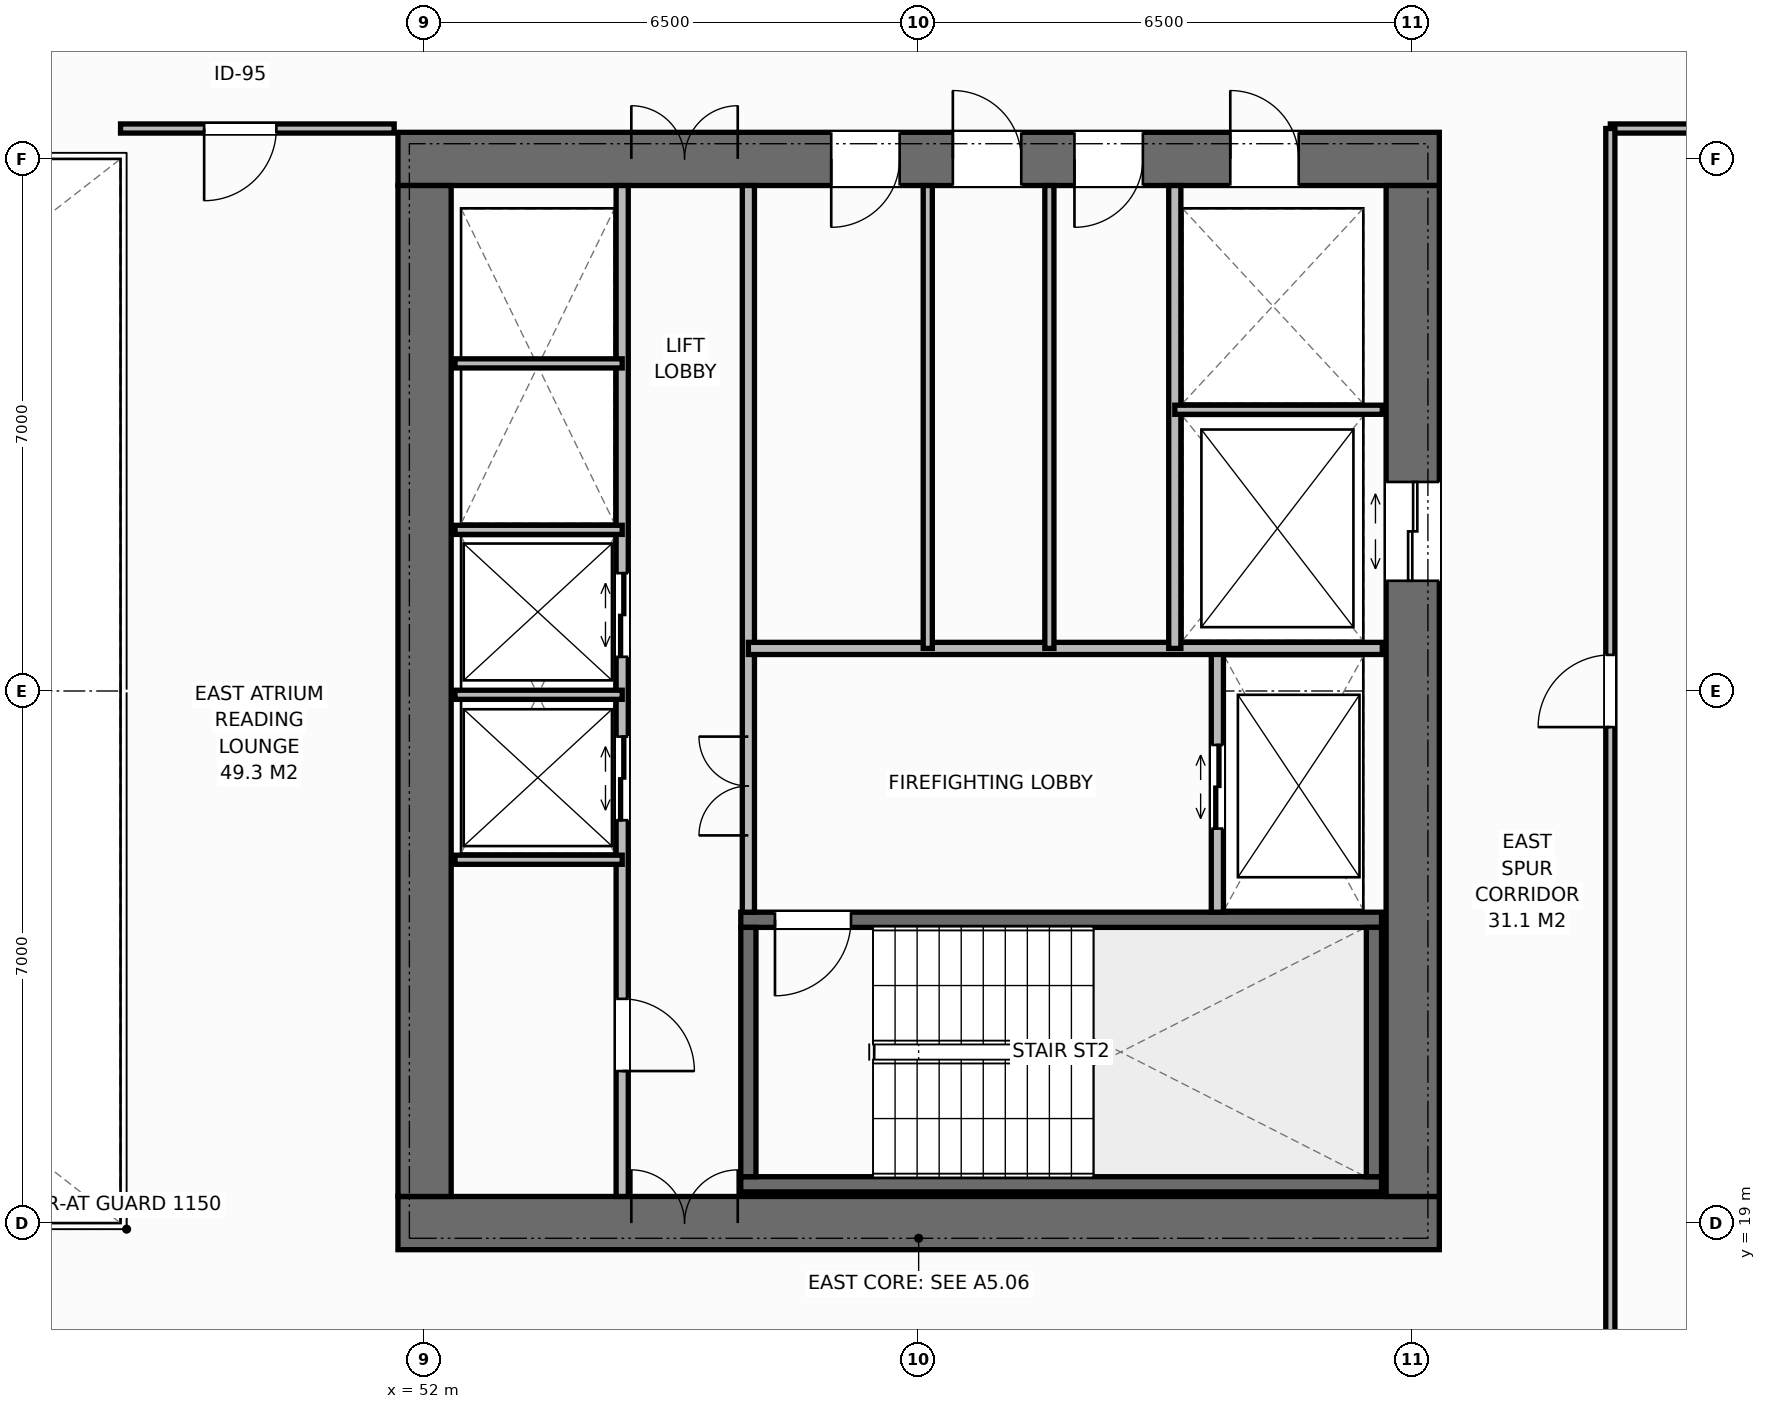
"""IFC4 building model, lengths in metres.
Left out: names, types, materials, properties, quantities, classifications, styles, units other than length and angle.
Written with IfcOpenShell. Run it as: python <this file> out.ifc"""

import sys

from ifc_helpers import new_model, si_unit, direction, frame, frame_2d, origin, place, context, subcontext, project, spatial, rectangle, extrude, element, fill, save


model = new_model("IFC4")
c1 = context("Model", 3, precision=1e-05, world=origin(), true_north=direction((0.0, 1.0)))
c2 = subcontext(c1, "Body", "Model", "MODEL_VIEW")
j1 = project(units=[si_unit("LENGTHUNIT", "METRE"), si_unit("PLANEANGLEUNIT", "RADIAN")], contexts=[c1])
p1 = place(None, origin())
s1 = spatial("IfcSite", under=j1, at=p1, CompositionType="ELEMENT")
p2 = place(p1, origin())
s2 = spatial("IfcBuilding", under=s1, at=p2, CompositionType="ELEMENT")
p3 = place(p2, frame((0.0, 0.0, 108.8)))
s3 = spatial("IfcBuildingStorey", under=s2, at=p3, CompositionType="ELEMENT", Elevation=108.8)
p4 = place(p3, frame((51.65, 19.0, 0.0), z_axis=(0.0, 0.0, 1.0), x_axis=(1.0, 0.0, 0.0)))
e1 = element("IfcWall", 1, at=p4, inside=s3, PredefinedType="SHEAR", context=c2, shape_type="SweptSolid", body=[
    extrude(rectangle(XDim=13.7, YDim=0.7, at=frame_2d((6.85, 0.0))), origin(), (0.0, 0.0, 1.0), 3.8),
])
p5 = place(p4, frame((3.07, 0.0, 0.0)))
e2 = element("IfcOpeningElement", 2, at=p5, cuts=e1, PredefinedType="OPENING", context=c2, shape_type="SweptSolid", body=[
    extrude(rectangle(XDim=1.4, YDim=2.2, at=frame_2d((0.7, 1.1))), frame((0.0, 0.36, 0.0), z_axis=(0.0, -1.0, 0.0), x_axis=(1.0, 0.0, 0.0)), (0.0, 0.0, 1.0), 0.72),
])
p6 = place(p3, frame((51.65, 33.0, 0.0), z_axis=(0.0, 0.0, 1.0), x_axis=(1.0, 0.0, 0.0)))
e3 = element("IfcWall", 3, at=p6, inside=s3, PredefinedType="SHEAR", context=c2, shape_type="SweptSolid", body=[
    extrude(rectangle(XDim=13.7, YDim=0.7, at=frame_2d((6.85, 0.0))), origin(), (0.0, 0.0, 1.0), 3.8),
])
p7 = place(p6, frame((3.07, 0.0, 0.0)))
e4 = element("IfcOpeningElement", 4, at=p7, cuts=e3, PredefinedType="OPENING", context=c2, shape_type="SweptSolid", body=[
    extrude(rectangle(XDim=1.4, YDim=2.2, at=frame_2d((0.7, 1.1))), frame((0.0, 0.36, 0.0), z_axis=(0.0, -1.0, 0.0), x_axis=(1.0, 0.0, 0.0)), (0.0, 0.0, 1.0), 0.72),
])
p8 = place(p6, frame((10.95, 0.0, 0.0)))
e5 = element("IfcOpeningElement", 5, at=p8, cuts=e3, PredefinedType="OPENING", context=c2, shape_type="SweptSolid", body=[
    extrude(rectangle(XDim=0.9, YDim=2.15, at=frame_2d((0.45, 1.075))), frame((0.0, 0.36, 0.0), z_axis=(0.0, -1.0, 0.0), x_axis=(1.0, 0.0, 0.0)), (0.0, 0.0, 1.0), 0.72),
])
p9 = place(p6, frame((5.7, 0.0, 0.0)))
e6 = element("IfcOpeningElement", 6, at=p9, cuts=e3, PredefinedType="OPENING", context=c2, shape_type="SweptSolid", body=[
    extrude(rectangle(XDim=0.9, YDim=2.15, at=frame_2d((0.45, 1.075))), frame((0.0, 0.36, 0.0), z_axis=(0.0, -1.0, 0.0), x_axis=(1.0, 0.0, 0.0)), (0.0, 0.0, 1.0), 0.72),
])
p10 = place(p6, frame((7.3, 0.0, 0.0)))
e7 = element("IfcOpeningElement", 7, at=p10, cuts=e3, PredefinedType="OPENING", context=c2, shape_type="SweptSolid", body=[
    extrude(rectangle(XDim=0.9, YDim=2.15, at=frame_2d((0.45, 1.075))), frame((0.0, 0.36, 0.0), z_axis=(0.0, -1.0, 0.0), x_axis=(1.0, 0.0, 0.0)), (0.0, 0.0, 1.0), 0.72),
])
p11 = place(p6, frame((8.9, 0.0, 0.0)))
e8 = element("IfcOpeningElement", 8, at=p11, cuts=e3, PredefinedType="OPENING", context=c2, shape_type="SweptSolid", body=[
    extrude(rectangle(XDim=0.9, YDim=2.15, at=frame_2d((0.45, 1.075))), frame((0.0, 0.36, 0.0), z_axis=(0.0, -1.0, 0.0), x_axis=(1.0, 0.0, 0.0)), (0.0, 0.0, 1.0), 0.72),
])
p12 = place(p3, frame((52.0, 19.35, 0.0), z_axis=(0.0, 0.0, 1.0), x_axis=(0.0, 1.0, 0.0)))
e9 = element("IfcWall", 9, at=p12, inside=s3, PredefinedType="SHEAR", context=c2, shape_type="SweptSolid", body=[
    extrude(rectangle(XDim=13.3, YDim=0.7, at=frame_2d((6.65, 0.0))), origin(), (0.0, 0.0, 1.0), 3.8),
])
p13 = place(p3, frame((65.0, 19.35, 0.0), z_axis=(0.0, 0.0, 1.0), x_axis=(0.0, 1.0, 0.0)))
e10 = element("IfcWall", 10, at=p13, inside=s3, PredefinedType="SHEAR", context=c2, shape_type="SweptSolid", body=[
    extrude(rectangle(XDim=13.3, YDim=0.7, at=frame_2d((6.65, 0.0))), origin(), (0.0, 0.0, 1.0), 3.8),
])
p14 = place(p13, frame((8.1, 0.0, 0.0)))
e11 = element("IfcOpeningElement", 11, at=p14, cuts=e10, PredefinedType="OPENING", context=c2, shape_type="SweptSolid", body=[
    extrude(rectangle(XDim=1.3, YDim=2.2, at=frame_2d((0.65, 1.1))), frame((0.0, 0.36, 0.0), z_axis=(0.0, -1.0, 0.0), x_axis=(1.0, 0.0, 0.0)), (0.0, 0.0, 1.0), 0.72),
])
p15 = place(p3, frame((56.16, 19.51, 0.0), z_axis=(0.0, 0.0, 1.0), x_axis=(1.0, 0.0, 0.0)))
e12 = element("IfcWall", 12, at=p15, inside=s3, PredefinedType="SHEAR", context=c2, shape_type="SweptSolid", body=[
    extrude(rectangle(XDim=8.43, YDim=0.2, at=frame_2d((4.215, 0.0))), origin(), (0.0, 0.0, 1.0), 3.8),
])
p16 = place(p3, frame((56.16, 22.99, 0.0), z_axis=(0.0, 0.0, 1.0), x_axis=(1.0, 0.0, 0.0)))
e13 = element("IfcWall", 13, at=p16, inside=s3, PredefinedType="SHEAR", context=c2, shape_type="SweptSolid", body=[
    extrude(rectangle(XDim=8.43, YDim=0.2, at=frame_2d((4.215, 0.0))), origin(), (0.0, 0.0, 1.0), 3.8),
])
p17 = place(p16, frame((0.45, 0.0, 0.0)))
e14 = element("IfcOpeningElement", 14, at=p17, cuts=e13, PredefinedType="OPENING", context=c2, shape_type="SweptSolid", body=[
    extrude(rectangle(XDim=1.0, YDim=2.15, at=frame_2d((0.5, 1.075))), frame((0.0, 0.11, 0.0), z_axis=(0.0, -1.0, 0.0), x_axis=(1.0, 0.0, 0.0)), (0.0, 0.0, 1.0), 0.22),
])
for number, where, z_axis, x_axis in (
    (15, (56.26, 19.61, 0.0), (0.0, 0.0, 1.0), (0.0, 1.0, 0.0)),
    (16, (64.49, 19.61, 0.0), (0.0, 0.0, 1.0), (0.0, 1.0, 0.0)),
):
    element("IfcWall", number, at=place(p3, frame(where, z_axis=z_axis, x_axis=x_axis)), inside=s3, PredefinedType="SHEAR", context=c2, shape_type="SweptSolid", body=[
        extrude(rectangle(XDim=3.28, YDim=0.2, at=frame_2d((1.64, 0.0))), origin(), (0.0, 0.0, 1.0), 3.8),
    ])
p18 = place(p3, frame((54.6, 19.35, 0.0), z_axis=(0.0, 0.0, 1.0), x_axis=(0.0, 1.0, 0.0)))
e17 = element("IfcWall", 17, at=p18, inside=s3, PredefinedType="STANDARD", context=c2, shape_type="SweptSolid", body=[
    extrude(rectangle(XDim=13.3, YDim=0.16, at=frame_2d((6.65, 0.0))), origin(), (0.0, 0.0, 1.0), 3.565),
])
p19 = place(p18, frame((1.65, 0.0, 0.0)))
e18 = element("IfcOpeningElement", 18, at=p19, cuts=e17, PredefinedType="OPENING", context=c2, shape_type="SweptSolid", body=[
    extrude(rectangle(XDim=0.95, YDim=2.15, at=frame_2d((0.475, 1.075))), frame((0.0, 0.09, 0.0), z_axis=(0.0, -1.0, 0.0), x_axis=(1.0, 0.0, 0.0)), (0.0, 0.0, 1.0), 0.18),
])
p20 = place(p18, frame((4.95, 0.0, 0.0)))
e19 = element("IfcOpeningElement", 19, at=p20, cuts=e17, PredefinedType="OPENING", context=c2, shape_type="SweptSolid", body=[
    extrude(rectangle(XDim=1.1, YDim=2.2, at=frame_2d((0.55, 1.1))), frame((0.0, 0.09, 0.0), z_axis=(0.0, -1.0, 0.0), x_axis=(1.0, 0.0, 0.0)), (0.0, 0.0, 1.0), 0.18),
])
p21 = place(p18, frame((7.1, 0.0, 0.0)))
e20 = element("IfcOpeningElement", 20, at=p21, cuts=e17, PredefinedType="OPENING", context=c2, shape_type="SweptSolid", body=[
    extrude(rectangle(XDim=1.1, YDim=2.2, at=frame_2d((0.55, 1.1))), frame((0.0, 0.09, 0.0), z_axis=(0.0, -1.0, 0.0), x_axis=(1.0, 0.0, 0.0)), (0.0, 0.0, 1.0), 0.18),
])
p22 = place(p3, frame((56.26, 23.09, 0.0), z_axis=(0.0, 0.0, 1.0), x_axis=(0.0, 1.0, 0.0)))
e21 = element("IfcWall", 21, at=p22, inside=s3, PredefinedType="STANDARD", context=c2, shape_type="SweptSolid", body=[
    extrude(rectangle(XDim=9.56, YDim=0.16, at=frame_2d((4.78, 0.0))), origin(), (0.0, 0.0, 1.0), 3.565),
])
p23 = place(p22, frame((1.01, 0.0, 0.0)))
e22 = element("IfcOpeningElement", 22, at=p23, cuts=e21, PredefinedType="OPENING", context=c2, shape_type="SweptSolid", body=[
    extrude(rectangle(XDim=1.3, YDim=2.2, at=frame_2d((0.65, 1.1))), frame((0.0, 0.09, 0.0), z_axis=(0.0, -1.0, 0.0), x_axis=(1.0, 0.0, 0.0)), (0.0, 0.0, 1.0), 0.18),
])
for number, where, z_axis, x_axis in (
    (23, (52.4, 23.78, 0.0), (0.0, 0.0, 1.0), (1.0, 0.0, 0.0)),
    (24, (52.4, 25.95, 0.0), (0.0, 0.0, 1.0), (1.0, 0.0, 0.0)),
    (25, (52.4, 28.12, 0.0), (0.0, 0.0, 1.0), (1.0, 0.0, 0.0)),
    (26, (52.4, 30.31, 0.0), (0.0, 0.0, 1.0), (1.0, 0.0, 0.0)),
):
    element("IfcWall", number, at=place(p3, frame(where, z_axis=z_axis, x_axis=x_axis)), inside=s3, PredefinedType="PARTITIONING", context=c2, shape_type="SweptSolid", body=[
        extrude(rectangle(XDim=2.2, YDim=0.12, at=frame_2d((1.1, 0.0))), origin(), (0.0, 0.0, 1.0), 3.565),
    ])
p24 = place(p3, frame((62.43, 23.09, 0.0), z_axis=(0.0, 0.0, 1.0), x_axis=(0.0, 1.0, 0.0)))
e27 = element("IfcWall", 27, at=p24, inside=s3, PredefinedType="STANDARD", context=c2, shape_type="SweptSolid", body=[
    extrude(rectangle(XDim=3.47, YDim=0.16, at=frame_2d((1.735, 0.0))), origin(), (0.0, 0.0, 1.0), 3.565),
])
p25 = place(p24, frame((1.1, 0.0, 0.0)))
e28 = element("IfcOpeningElement", 28, at=p25, cuts=e27, PredefinedType="OPENING", context=c2, shape_type="SweptSolid", body=[
    extrude(rectangle(XDim=1.1, YDim=2.2, at=frame_2d((0.55, 1.1))), frame((0.0, 0.09, 0.0), z_axis=(0.0, -1.0, 0.0), x_axis=(1.0, 0.0, 0.0)), (0.0, 0.0, 1.0), 0.18),
])
p26 = place(p3, frame((56.26, 26.56, 0.0), z_axis=(0.0, 0.0, 1.0), x_axis=(1.0, 0.0, 0.0)))
e29 = element("IfcWall", 29, at=p26, inside=s3, PredefinedType="STANDARD", context=c2, shape_type="SweptSolid", body=[
    extrude(rectangle(XDim=8.34, YDim=0.16, at=frame_2d((4.17, 0.0))), origin(), (0.0, 0.0, 1.0), 3.565),
])
p27 = place(p3, frame((61.87, 26.56, 0.0), z_axis=(0.0, 0.0, 1.0), x_axis=(0.0, 1.0, 0.0)))
e30 = element("IfcWall", 30, at=p27, inside=s3, PredefinedType="STANDARD", context=c2, shape_type="SweptSolid", body=[
    extrude(rectangle(XDim=6.09, YDim=0.16, at=frame_2d((3.045, 0.0))), origin(), (0.0, 0.0, 1.0), 3.565),
])
p28 = place(p3, frame((61.87, 29.7, 0.0), z_axis=(0.0, 0.0, 1.0), x_axis=(1.0, 0.0, 0.0)))
e31 = element("IfcWall", 31, at=p28, inside=s3, PredefinedType="PARTITIONING", context=c2, shape_type="SweptSolid", body=[
    extrude(rectangle(XDim=2.73, YDim=0.12, at=frame_2d((1.365, 0.0))), origin(), (0.0, 0.0, 1.0), 3.565),
])
for number, where, z_axis, x_axis in (
    (32, (58.62, 26.56, 0.0), (0.0, 0.0, 1.0), (0.0, 1.0, 0.0)),
    (33, (60.22, 26.56, 0.0), (0.0, 0.0, 1.0), (0.0, 1.0, 0.0)),
):
    element("IfcWall", number, at=place(p3, frame(where, z_axis=z_axis, x_axis=x_axis)), inside=s3, PredefinedType="PARTITIONING", context=c2, shape_type="SweptSolid", body=[
        extrude(rectangle(XDim=6.09, YDim=0.12, at=frame_2d((3.045, 0.0))), origin(), (0.0, 0.0, 1.0), 3.565),
    ])
p29 = place(p3, frame((48.0, 33.4, 0.0), z_axis=(0.0, 0.0, 1.0), x_axis=(1.0, 0.0, 0.0)))
e34 = element("IfcWall", 34, at=p29, inside=s3, PredefinedType="PARTITIONING", context=c2, shape_type="SweptSolid", body=[
    extrude(rectangle(XDim=3.6, YDim=0.12, at=frame_2d((1.8, 0.0))), origin(), (0.0, 0.0, 1.0), 3.565),
])
p30 = place(p29, frame((1.1, 0.0, 0.0)))
e35 = element("IfcOpeningElement", 35, at=p30, cuts=e34, PredefinedType="OPENING", context=c2, shape_type="SweptSolid", body=[
    extrude(rectangle(XDim=0.95, YDim=2.15, at=frame_2d((0.475, 1.075))), frame((0.0, 0.07, 0.0), z_axis=(0.0, -1.0, 0.0), x_axis=(1.0, 0.0, 0.0)), (0.0, 0.0, 1.0), 0.14),
])
p31 = place(p3, frame((67.6, 33.4, 0.0), z_axis=(0.0, 0.0, 1.0), x_axis=(1.0, 0.0, 0.0)))
e36 = element("IfcWall", 36, at=p31, inside=s3, PredefinedType="PARTITIONING", context=c2, shape_type="SweptSolid", body=[
    extrude(rectangle(XDim=8.58, YDim=0.12, at=frame_2d((4.29, 0.0))), origin(), (0.0, 0.0, 1.0), 3.565),
])
p32 = place(p3, frame((67.6, 16.5, 0.0), z_axis=(0.0, 0.0, 1.0), x_axis=(0.0, 1.0, 0.0)))
e37 = element("IfcWall", 37, at=p32, inside=s3, PredefinedType="PARTITIONING", context=c2, shape_type="SweptSolid", body=[
    extrude(rectangle(XDim=16.9, YDim=0.12, at=frame_2d((8.45, 0.0))), origin(), (0.0, 0.0, 1.0), 3.565),
])
p33 = place(p32, frame((9.025, 0.0, 0.0)))
e38 = element("IfcOpeningElement", 38, at=p33, cuts=e37, PredefinedType="OPENING", context=c2, shape_type="SweptSolid", body=[
    extrude(rectangle(XDim=0.95, YDim=2.15, at=frame_2d((0.475, 1.075))), frame((0.0, 0.07, 0.0), z_axis=(0.0, -1.0, 0.0), x_axis=(1.0, 0.0, 0.0)), (0.0, 0.0, 1.0), 0.14),
])
p34 = place(p5, origin())
e39 = element("IfcDoor", 39, at=p34, inside=s3, OperationType="DOUBLE_DOOR_SINGLE_SWING", PredefinedType="DOOR", context=c2, shape_type="SweptSolid", body=[
    extrude(rectangle(XDim=1.4, YDim=2.2, at=frame_2d((0.7, 1.1))), frame((0.0, 0.125, 0.0), z_axis=(0.0, -1.0, 0.0), x_axis=(1.0, 0.0, 0.0)), (0.0, 0.0, 1.0), 0.05),
])
fill(e2, e39)
p35 = place(p7, origin())
e40 = element("IfcDoor", 40, at=p35, inside=s3, OperationType="DOUBLE_DOOR_SINGLE_SWING", PredefinedType="DOOR", context=c2, shape_type="SweptSolid", body=[
    extrude(rectangle(XDim=1.4, YDim=2.2, at=frame_2d((0.7, 1.1))), frame((0.0, -0.075, 0.0), z_axis=(0.0, -1.0, 0.0), x_axis=(1.0, 0.0, 0.0)), (0.0, 0.0, 1.0), 0.05),
])
fill(e4, e40)
p36 = place(p19, origin())
e41 = element("IfcDoor", 41, at=p36, inside=s3, OperationType="SINGLE_SWING_RIGHT", PredefinedType="DOOR", context=c2, shape_type="SweptSolid", body=[
    extrude(rectangle(XDim=0.95, YDim=2.15, at=frame_2d((0.475, 1.075))), frame((0.0, 0.025, 0.0), z_axis=(0.0, -1.0, 0.0), x_axis=(1.0, 0.0, 0.0)), (0.0, 0.0, 1.0), 0.05),
])
fill(e18, e41)
p37 = place(p20, origin())
e42 = element("IfcDoor", 42, at=p37, inside=s3, OperationType="DOUBLE_DOOR_SLIDING", PredefinedType="DOOR", context=c2, shape_type="SweptSolid", body=[
    extrude(rectangle(XDim=1.1, YDim=2.2, at=frame_2d((0.55, 1.1))), frame((0.0, 0.025, 0.0), z_axis=(0.0, -1.0, 0.0), x_axis=(1.0, 0.0, 0.0)), (0.0, 0.0, 1.0), 0.05),
])
fill(e19, e42)
p38 = place(p21, origin())
e43 = element("IfcDoor", 43, at=p38, inside=s3, OperationType="DOUBLE_DOOR_SLIDING", PredefinedType="DOOR", context=c2, shape_type="SweptSolid", body=[
    extrude(rectangle(XDim=1.1, YDim=2.2, at=frame_2d((0.55, 1.1))), frame((0.0, 0.025, 0.0), z_axis=(0.0, -1.0, 0.0), x_axis=(1.0, 0.0, 0.0)), (0.0, 0.0, 1.0), 0.05),
])
fill(e20, e43)
p39 = place(p17, origin())
e44 = element("IfcDoor", 44, at=p39, inside=s3, OperationType="SINGLE_SWING_RIGHT", PredefinedType="DOOR", context=c2, shape_type="SweptSolid", body=[
    extrude(rectangle(XDim=1.0, YDim=2.15, at=frame_2d((0.5, 1.075))), frame((0.0, 0.025, 0.0), z_axis=(0.0, -1.0, 0.0), x_axis=(1.0, 0.0, 0.0)), (0.0, 0.0, 1.0), 0.05),
])
fill(e14, e44)
p40 = place(p25, origin())
e45 = element("IfcDoor", 45, at=p40, inside=s3, OperationType="DOUBLE_DOOR_SLIDING", PredefinedType="DOOR", context=c2, shape_type="SweptSolid", body=[
    extrude(rectangle(XDim=1.1, YDim=2.2, at=frame_2d((0.55, 1.1))), frame((0.0, 0.025, 0.0), z_axis=(0.0, -1.0, 0.0), x_axis=(1.0, 0.0, 0.0)), (0.0, 0.0, 1.0), 0.05),
])
fill(e28, e45)
p41 = place(p23, origin())
e46 = element("IfcDoor", 46, at=p41, inside=s3, OperationType="DOUBLE_DOOR_SINGLE_SWING", PredefinedType="DOOR", context=c2, shape_type="SweptSolid", body=[
    extrude(rectangle(XDim=1.3, YDim=2.2, at=frame_2d((0.65, 1.1))), frame((0.0, 0.025, 0.0), z_axis=(0.0, -1.0, 0.0), x_axis=(1.0, 0.0, 0.0)), (0.0, 0.0, 1.0), 0.05),
])
fill(e22, e46)
p42 = place(p14, origin())
e47 = element("IfcDoor", 47, at=p42, inside=s3, OperationType="DOUBLE_DOOR_SLIDING", PredefinedType="DOOR", context=c2, shape_type="SweptSolid", body=[
    extrude(rectangle(XDim=1.3, YDim=2.2, at=frame_2d((0.65, 1.1))), frame((0.0, 0.025, 0.0), z_axis=(0.0, -1.0, 0.0), x_axis=(1.0, 0.0, 0.0)), (0.0, 0.0, 1.0), 0.05),
])
fill(e11, e47)
p43 = place(p8, origin())
e48 = element("IfcDoor", 48, at=p43, inside=s3, OperationType="SINGLE_SWING_LEFT", PredefinedType="DOOR", context=c2, shape_type="SweptSolid", body=[
    extrude(rectangle(XDim=0.9, YDim=2.15, at=frame_2d((0.45, 1.075))), frame((0.0, -0.075, 0.0), z_axis=(0.0, -1.0, 0.0), x_axis=(1.0, 0.0, 0.0)), (0.0, 0.0, 1.0), 0.05),
])
fill(e5, e48)
p44 = place(p9, origin())
e49 = element("IfcDoor", 49, at=p44, inside=s3, OperationType="SINGLE_SWING_RIGHT", PredefinedType="DOOR", context=c2, shape_type="SweptSolid", body=[
    extrude(rectangle(XDim=0.9, YDim=2.15, at=frame_2d((0.45, 1.075))), frame((0.0, -0.075, 0.0), z_axis=(0.0, -1.0, 0.0), x_axis=(1.0, 0.0, 0.0)), (0.0, 0.0, 1.0), 0.05),
])
fill(e6, e49)
p45 = place(p10, origin())
e50 = element("IfcDoor", 50, at=p45, inside=s3, OperationType="SINGLE_SWING_LEFT", PredefinedType="DOOR", context=c2, shape_type="SweptSolid", body=[
    extrude(rectangle(XDim=0.9, YDim=2.15, at=frame_2d((0.45, 1.075))), frame((0.0, -0.075, 0.0), z_axis=(0.0, -1.0, 0.0), x_axis=(1.0, 0.0, 0.0)), (0.0, 0.0, 1.0), 0.05),
])
fill(e7, e50)
p46 = place(p11, origin())
e51 = element("IfcDoor", 51, at=p46, inside=s3, OperationType="SINGLE_SWING_RIGHT", PredefinedType="DOOR", context=c2, shape_type="SweptSolid", body=[
    extrude(rectangle(XDim=0.9, YDim=2.15, at=frame_2d((0.45, 1.075))), frame((0.0, -0.075, 0.0), z_axis=(0.0, -1.0, 0.0), x_axis=(1.0, 0.0, 0.0)), (0.0, 0.0, 1.0), 0.05),
])
fill(e8, e51)
p47 = place(p30, origin())
e52 = element("IfcDoor", 52, at=p47, inside=s3, OperationType="SINGLE_SWING_RIGHT", PredefinedType="DOOR", context=c2, shape_type="SweptSolid", body=[
    extrude(rectangle(XDim=0.95, YDim=2.15, at=frame_2d((0.475, 1.075))), frame((0.0, 0.025, 0.0), z_axis=(0.0, -1.0, 0.0), x_axis=(1.0, 0.0, 0.0)), (0.0, 0.0, 1.0), 0.05),
])
fill(e35, e52)
p48 = place(p33, origin())
e53 = element("IfcDoor", 53, at=p48, inside=s3, OperationType="SINGLE_SWING_LEFT", PredefinedType="DOOR", context=c2, shape_type="SweptSolid", body=[
    extrude(rectangle(XDim=0.95, YDim=2.15, at=frame_2d((0.475, 1.075))), frame((0.0, 0.025, 0.0), z_axis=(0.0, -1.0, 0.0), x_axis=(1.0, 0.0, 0.0)), (0.0, 0.0, 1.0), 0.05),
])
fill(e38, e53)
save(model, sys.argv[1])
